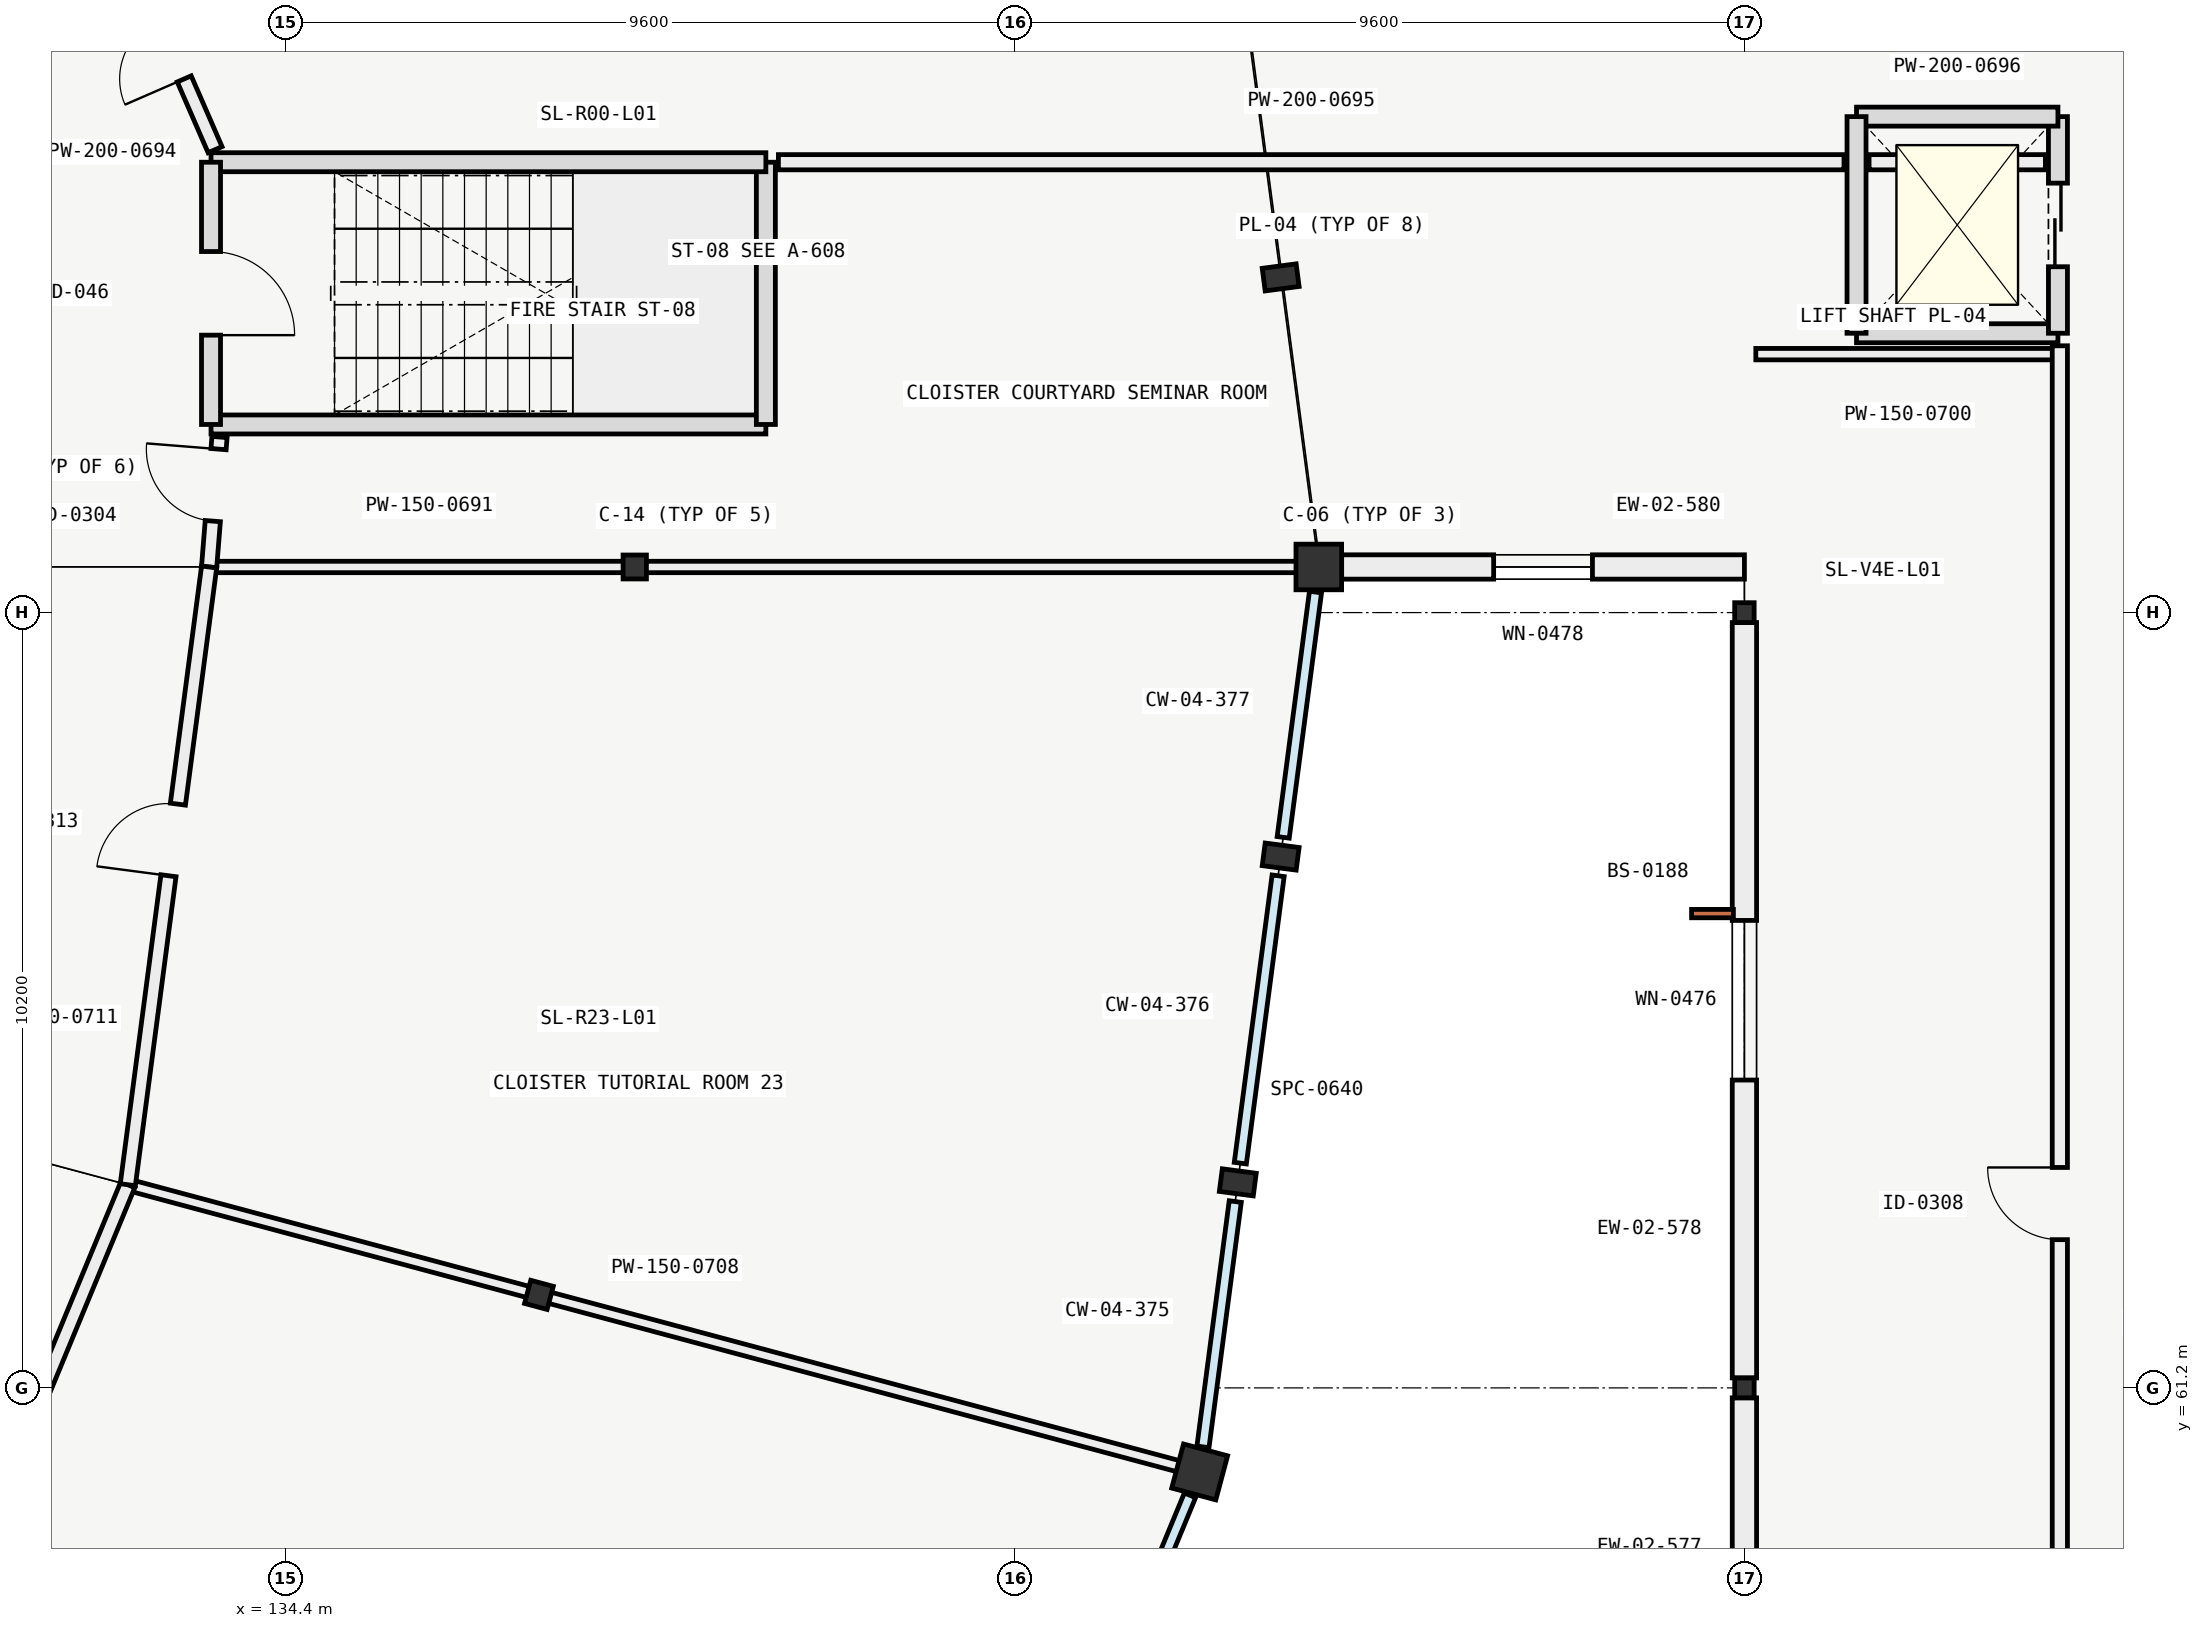
"""IFC4 building model, lengths in metres.
Left out: names, types, materials, properties, quantities, classifications, styles, units other than length and angle.
Written with IfcOpenShell. Run it as: python <this file> out.ifc"""

import sys

from ifc_helpers import new_model, si_unit, direction, frame, frame_2d, origin, origin_2d, place, context, subcontext, project, spatial, rectangle, i_section, extrude, element, fill, save


model = new_model("IFC4")
c1 = context("Model", 3, precision=1e-05, world=origin(), true_north=direction((0.0, 1.0)))
c2 = subcontext(c1, "Body", "Model", "MODEL_VIEW")
j1 = project(units=[si_unit("LENGTHUNIT", "METRE"), si_unit("PLANEANGLEUNIT", "RADIAN")], contexts=[c1])
p1 = place(None, origin())
s1 = spatial("IfcSite", under=j1, at=p1, CompositionType="ELEMENT")
p2 = place(p1, origin())
s2 = spatial("IfcBuilding", under=s1, at=p2, CompositionType="ELEMENT")
p3 = place(p2, frame((0.0, 0.0, 5.4)))
s3 = spatial("IfcBuildingStorey", under=s2, at=p3, CompositionType="ELEMENT", Elevation=5.4)
p4 = place(p3, frame((139.0, 72.0, 0.0), z_axis=(0.0, 0.0, 1.0), x_axis=(1.0, 0.0, 0.0)))
e1 = element("IfcColumn", 1, at=p4, inside=s3, PredefinedType="COLUMN", context=c2, shape_type="SweptSolid", body=[
    extrude(i_section(OverallWidth=0.307, OverallDepth=0.315, WebThickness=0.012, FlangeThickness=0.019, FilletRadius=0.017, at=origin_2d()), origin(), (0.0, 0.0, 1.0), 4.2),
])
p5 = place(p3, frame((148.0, 72.0, 0.0), z_axis=(0.0, 0.0, 1.0), x_axis=(1.0, 0.0, 0.0)))
e2 = element("IfcColumn", 2, at=p5, inside=s3, PredefinedType="COLUMN", context=c2, shape_type="SweptSolid", body=[
    extrude(rectangle(XDim=0.6, YDim=0.6, at=origin_2d()), origin(), (0.0, 0.0, 1.0), 4.2),
])
p6 = place(p3, frame((137.739, 62.424, 0.0), z_axis=(0.0, 0.0, 1.0), x_axis=(-0.965925826289, 0.258819045103, 0.0)))
e3 = element("IfcColumn", 3, at=p6, inside=s3, PredefinedType="COLUMN", context=c2, shape_type="SweptSolid", body=[
    extrude(i_section(OverallWidth=0.307, OverallDepth=0.315, WebThickness=0.012, FlangeThickness=0.019, FilletRadius=0.017, at=origin_2d()), origin(), (0.0, 0.0, 1.0), 4.2),
])
p7 = place(p3, frame((146.433, 60.094, 0.0), z_axis=(0.0, 0.0, 1.0), x_axis=(-0.965925826289, 0.258819045103, 0.0)))
e4 = element("IfcColumn", 4, at=p7, inside=s3, PredefinedType="COLUMN", context=c2, shape_type="SweptSolid", body=[
    extrude(rectangle(XDim=0.6, YDim=0.6, at=origin_2d()), origin(), (0.0, 0.0, 1.0), 4.2),
])
for number, where, z_axis, x_axis in (
    (5, (147.498, 75.81, 0.0), (0.0, 0.0, 1.0), (-0.131, 0.991, 0.0)),
    (6, (146.934, 63.904, 0.0), (0.0, 0.0, 1.0), (0.131, 0.991, 0.0)),
    (7, (147.498, 68.19, 0.0), (0.0, 0.0, 1.0), (0.131, 0.991, 0.0)),
):
    element("IfcColumn", number, at=place(p3, frame(where, z_axis=z_axis, x_axis=x_axis)), inside=s3, PredefinedType="PILASTER", context=c2, shape_type="SweptSolid", body=[
        extrude(rectangle(XDim=0.3, YDim=0.45, at=origin_2d()), origin(), (0.0, 0.0, 1.0), 4.2),
    ])
for number, where, z_axis, x_axis in (
    (8, (153.6, 61.2, 0.0), (0.0, 0.0, 1.0), (1.0, 0.0, 0.0)),
    (9, (153.6, 71.4, 0.0), (0.0, 0.0, 1.0), (1.0, 0.0, 0.0)),
):
    element("IfcColumn", number, at=place(p3, frame(where, z_axis=z_axis, x_axis=x_axis)), inside=s3, PredefinedType="COLUMN", context=c2, shape_type="SweptSolid", body=[
        extrude(i_section(OverallWidth=0.256, OverallDepth=0.26, WebThickness=0.01, FlangeThickness=0.017, FilletRadius=0.014, at=origin_2d()), origin(), (0.0, 0.0, 1.0), 4.2),
    ])
p8 = place(p3, frame((153.6, 51.131, 0.0), z_axis=(0.0, 0.0, 1.0), x_axis=(0.0, 1.0, 0.0)))
e10 = element("IfcWall", 10, at=p8, inside=s3, PredefinedType="SOLIDWALL", context=c2, shape_type="SweptSolid", body=[
    extrude(rectangle(XDim=9.938, YDim=0.32, at=frame_2d((4.969, 0.0))), origin(), (0.0, 0.0, 1.0), 3.514),
])
p9 = place(p8, frame((3.919, 0.0, 0.85)))
e11 = element("IfcOpeningElement", 11, at=p9, cuts=e10, PredefinedType="OPENING", context=c2, shape_type="SweptSolid", body=[
    extrude(rectangle(XDim=2.1, YDim=2.4, at=frame_2d((1.05, 1.2))), frame((0.0, 0.17, 0.0), z_axis=(0.0, -1.0, 0.0), x_axis=(1.0, 0.0, 0.0)), (0.0, 0.0, 1.0), 0.34),
])
p10 = place(p3, frame((153.6, 61.331, 0.0), z_axis=(0.0, 0.0, 1.0), x_axis=(0.0, 1.0, 0.0)))
e12 = element("IfcWall", 12, at=p10, inside=s3, PredefinedType="SOLIDWALL", context=c2, shape_type="SweptSolid", body=[
    extrude(rectangle(XDim=9.938, YDim=0.32, at=frame_2d((4.969, 0.0))), origin(), (0.0, 0.0, 1.0), 3.514),
])
p11 = place(p10, frame((3.919, 0.0, 0.85)))
e13 = element("IfcOpeningElement", 13, at=p11, cuts=e12, PredefinedType="OPENING", context=c2, shape_type="SweptSolid", body=[
    extrude(rectangle(XDim=2.1, YDim=2.4, at=frame_2d((1.05, 1.2))), frame((0.0, 0.17, 0.0), z_axis=(0.0, -1.0, 0.0), x_axis=(1.0, 0.0, 0.0)), (0.0, 0.0, 1.0), 0.34),
])
p12 = place(p3, frame((153.6, 72.0, 0.0), z_axis=(0.0, 0.0, 1.0), x_axis=(-1.0, 0.0, 0.0)))
e14 = element("IfcWall", 14, at=p12, inside=s3, PredefinedType="SOLIDWALL", context=c2, shape_type="SweptSolid", body=[
    extrude(rectangle(XDim=5.299, YDim=0.32, at=frame_2d((2.649, 0.0))), origin(), (0.0, 0.0, 1.0), 3.494),
])
p13 = place(p12, frame((2.0, 0.0, 0.9)))
e15 = element("IfcOpeningElement", 15, at=p13, cuts=e14, PredefinedType="OPENING", context=c2, shape_type="SweptSolid", body=[
    extrude(rectangle(XDim=1.3, YDim=1.75, at=frame_2d((0.65, 0.875))), frame((0.0, 0.17, 0.0), z_axis=(0.0, -1.0, 0.0), x_axis=(1.0, 0.0, 0.0)), (0.0, 0.0, 1.0), 0.34),
])
p14 = place(p3, frame((133.425, 73.875, 0.0), z_axis=(0.0, 0.0, 1.0), x_axis=(1.0, 0.0, 0.0)))
e16 = element("IfcWall", 16, at=p14, inside=s3, PredefinedType="SOLIDWALL", context=c2, shape_type="SweptSolid", body=[
    extrude(rectangle(XDim=7.3, YDim=0.25, at=frame_2d((3.65, 0.0))), origin(), (0.0, 0.0, 1.0), 3.92),
])
p15 = place(p3, frame((140.725, 73.875, 0.0), z_axis=(0.0, 0.0, 1.0), x_axis=(0.0, 1.0, 0.0)))
e17 = element("IfcWall", 17, at=p15, inside=s3, PredefinedType="SOLIDWALL", context=c2, shape_type="SweptSolid", body=[
    extrude(rectangle(XDim=3.45, YDim=0.25, at=frame_2d((1.725, 0.0))), origin(), (0.0, 0.0, 1.0), 3.92),
])
p16 = place(p3, frame((140.725, 77.325, 0.0), z_axis=(0.0, 0.0, 1.0), x_axis=(-1.0, 0.0, 0.0)))
e18 = element("IfcWall", 18, at=p16, inside=s3, PredefinedType="SOLIDWALL", context=c2, shape_type="SweptSolid", body=[
    extrude(rectangle(XDim=7.3, YDim=0.25, at=frame_2d((3.65, 0.0))), origin(), (0.0, 0.0, 1.0), 3.92),
])
p17 = place(p3, frame((133.425, 77.325, 0.0), z_axis=(0.0, 0.0, 1.0), x_axis=(0.0, -1.0, 0.0)))
e19 = element("IfcWall", 19, at=p17, inside=s3, PredefinedType="SOLIDWALL", context=c2, shape_type="SweptSolid", body=[
    extrude(rectangle(XDim=3.45, YDim=0.25, at=frame_2d((1.725, 0.0))), origin(), (0.0, 0.0, 1.0), 3.92),
])
p18 = place(p17, frame((1.175, 0.0, 0.0)))
e20 = element("IfcOpeningElement", 20, at=p18, cuts=e19, PredefinedType="OPENING", context=c2, shape_type="SweptSolid", body=[
    extrude(rectangle(XDim=1.1, YDim=2.2, at=frame_2d((0.55, 1.1))), frame((0.0, 0.135, 0.0), z_axis=(0.0, -1.0, 0.0), x_axis=(1.0, 0.0, 0.0)), (0.0, 0.0, 1.0), 0.27),
])
p19 = place(p3, frame((155.075, 75.075, 0.0), z_axis=(0.0, 0.0, 1.0), x_axis=(1.0, 0.0, 0.0)))
e21 = element("IfcWall", 21, at=p19, inside=s3, PredefinedType="SOLIDWALL", context=c2, shape_type="SweptSolid", body=[
    extrude(rectangle(XDim=2.65, YDim=0.25, at=frame_2d((1.325, 0.0))), origin(), (0.0, 0.0, 1.0), 3.92),
])
p20 = place(p3, frame((157.725, 75.075, 0.0), z_axis=(0.0, 0.0, 1.0), x_axis=(0.0, 1.0, 0.0)))
e22 = element("IfcWall", 22, at=p20, inside=s3, PredefinedType="SOLIDWALL", context=c2, shape_type="SweptSolid", body=[
    extrude(rectangle(XDim=2.85, YDim=0.25, at=frame_2d((1.425, 0.0))), origin(), (0.0, 0.0, 1.0), 3.92),
])
p21 = place(p20, frame((0.875, 0.0, 0.0)))
e23 = element("IfcOpeningElement", 23, at=p21, cuts=e22, PredefinedType="OPENING", context=c2, shape_type="SweptSolid", body=[
    extrude(rectangle(XDim=1.1, YDim=2.1, at=frame_2d((0.55, 1.05))), frame((0.0, 0.135, 0.0), z_axis=(0.0, -1.0, 0.0), x_axis=(1.0, 0.0, 0.0)), (0.0, 0.0, 1.0), 0.27),
])
p22 = place(p3, frame((157.725, 77.925, 0.0), z_axis=(0.0, 0.0, 1.0), x_axis=(-1.0, 0.0, 0.0)))
e24 = element("IfcWall", 24, at=p22, inside=s3, PredefinedType="SOLIDWALL", context=c2, shape_type="SweptSolid", body=[
    extrude(rectangle(XDim=2.65, YDim=0.25, at=frame_2d((1.325, 0.0))), origin(), (0.0, 0.0, 1.0), 3.92),
])
p23 = place(p3, frame((155.075, 77.925, 0.0), z_axis=(0.0, 0.0, 1.0), x_axis=(0.0, -1.0, 0.0)))
e25 = element("IfcWall", 25, at=p23, inside=s3, PredefinedType="SOLIDWALL", context=c2, shape_type="SweptSolid", body=[
    extrude(rectangle(XDim=2.85, YDim=0.25, at=frame_2d((1.425, 0.0))), origin(), (0.0, 0.0, 1.0), 3.92),
])
p24 = place(p3, frame((133.4, 72.0, 0.0), z_axis=(0.0, 0.0, 1.0), x_axis=(1.0, 0.0, 0.0)))
e26 = element("IfcWall", 26, at=p24, inside=s3, PredefinedType="PARTITIONING", context=c2, shape_type="SweptSolid", body=[
    extrude(rectangle(XDim=14.48, YDim=0.15, at=frame_2d((7.24, 0.0))), origin(), (0.0, 0.0, 1.0), 3.367),
])
p25 = place(p3, frame((133.4, 72.0, 0.0), z_axis=(0.0, 0.0, 1.0), x_axis=(0.07984138391, 0.996807580938, 0.0)))
e27 = element("IfcWall", 27, at=p25, inside=s3, PredefinedType="PARTITIONING", context=c2, shape_type="SweptSolid", body=[
    extrude(rectangle(XDim=1.715, YDim=0.2, at=frame_2d((0.858, 0.0))), origin(), (0.0, 0.0, 1.0), 3.372),
])
p26 = place(p25, frame((0.605, 0.0, 0.0)))
e28 = element("IfcOpeningElement", 28, at=p26, cuts=e27, PredefinedType="OPENING", context=c2, shape_type="SweptSolid", body=[
    extrude(rectangle(XDim=0.95, YDim=2.1, at=frame_2d((0.475, 1.05))), frame((0.0, 0.11, 0.0), z_axis=(0.0, -1.0, 0.0), x_axis=(1.0, 0.0, 0.0)), (0.0, 0.0, 1.0), 0.22),
])
p27 = place(p3, frame((133.478, 77.49, 0.0), z_axis=(0.0, 0.0, 1.0), x_axis=(-0.399219580964, 0.916855346374, 0.0)))
e29 = element("IfcWall", 29, at=p27, inside=s3, PredefinedType="PARTITIONING", context=c2, shape_type="SweptSolid", body=[
    extrude(rectangle(XDim=2.876, YDim=0.2, at=frame_2d((1.438, 0.0))), origin(), (0.0, 0.0, 1.0), 3.372),
])
p28 = place(p27, frame((1.016, 0.0, 0.0)))
e30 = element("IfcOpeningElement", 30, at=p28, cuts=e29, PredefinedType="OPENING", context=c2, shape_type="SweptSolid", body=[
    extrude(rectangle(XDim=1.7, YDim=2.2, at=frame_2d((0.85, 1.1))), frame((0.0, 0.11, 0.0), z_axis=(0.0, -1.0, 0.0), x_axis=(1.0, 0.0, 0.0)), (0.0, 0.0, 1.0), 0.22),
])
p29 = place(p3, frame((140.89, 77.325, 0.0), z_axis=(0.0, 0.0, 1.0), x_axis=(1.0, 0.0, 0.0)))
e31 = element("IfcWall", 31, at=p29, inside=s3, PredefinedType="PARTITIONING", context=c2, shape_type="SweptSolid", body=[
    extrude(rectangle(XDim=14.02, YDim=0.2, at=frame_2d((7.01, 0.0))), origin(), (0.0, 0.0, 1.0), 3.443),
])
p30 = place(p3, frame((155.24, 77.325, 0.0), z_axis=(0.0, 0.0, 1.0), x_axis=(1.0, 0.0, 0.0)))
e32 = element("IfcWall", 32, at=p30, inside=s3, PredefinedType="PARTITIONING", context=c2, shape_type="SweptSolid", body=[
    extrude(rectangle(XDim=2.32, YDim=0.2, at=frame_2d((1.16, 0.0))), origin(), (0.0, 0.0, 1.0), 3.85),
])
p31 = place(p3, frame((153.75, 74.8, 0.0), z_axis=(0.0, 0.0, 1.0), x_axis=(1.0, 0.0, 0.0)))
e33 = element("IfcWall", 33, at=p31, inside=s3, PredefinedType="PARTITIONING", context=c2, shape_type="SweptSolid", body=[
    extrude(rectangle(XDim=4.0, YDim=0.15, at=frame_2d((2.0, 0.0))), origin(), (0.0, 0.0, 1.0), 3.85),
])
p32 = place(p3, frame((157.75, 51.15, 0.0), z_axis=(0.0, 0.0, 1.0), x_axis=(0.0, 1.0, 0.0)))
e34 = element("IfcWall", 34, at=p32, inside=s3, PredefinedType="PARTITIONING", context=c2, shape_type="SweptSolid", body=[
    extrude(rectangle(XDim=23.76, YDim=0.2, at=frame_2d((11.88, 0.0))), origin(), (0.0, 0.0, 1.0), 3.44),
])
p33 = place(p32, frame((12.0, 0.0, 0.0)))
e35 = element("IfcOpeningElement", 35, at=p33, cuts=e34, PredefinedType="OPENING", context=c2, shape_type="SweptSolid", body=[
    extrude(rectangle(XDim=0.95, YDim=2.1, at=frame_2d((0.475, 1.05))), frame((0.0, 0.11, 0.0), z_axis=(0.0, -1.0, 0.0), x_axis=(1.0, 0.0, 0.0)), (0.0, 0.0, 1.0), 0.22),
])
p34 = place(p3, frame((132.33, 63.873, 0.0), z_axis=(0.0, 0.0, 1.0), x_axis=(0.965928107853, -0.258810530041, 0.0)))
e36 = element("IfcWall", 36, at=p34, inside=s3, PredefinedType="PARTITIONING", context=c2, shape_type="SweptSolid", body=[
    extrude(rectangle(XDim=14.48, YDim=0.15, at=frame_2d((7.24, 0.0))), origin(), (0.0, 0.0, 1.0), 3.367),
])
p35 = place(p3, frame((129.193, 56.3, 0.0), z_axis=(0.0, 0.0, 1.0), x_axis=(0.382696385238, 0.923874167149, 0.0)))
e37 = element("IfcWall", 37, at=p35, inside=s3, PredefinedType="PARTITIONING", context=c2, shape_type="SweptSolid", body=[
    extrude(rectangle(XDim=8.197, YDim=0.2, at=frame_2d((4.099, 0.0))), origin(), (0.0, 0.0, 1.0), 3.372),
])
p36 = place(p3, frame((132.33, 63.873, 0.0), z_axis=(0.0, 0.0, 1.0), x_axis=(0.130513066404, 0.991446589332, 0.0)))
e38 = element("IfcWall", 38, at=p36, inside=s3, PredefinedType="PARTITIONING", context=c2, shape_type="SweptSolid", body=[
    extrude(rectangle(XDim=8.197, YDim=0.2, at=frame_2d((4.099, 0.0))), origin(), (0.0, 0.0, 1.0), 3.372),
])
p37 = place(p36, frame((4.1, 0.0, 0.0)))
e39 = element("IfcOpeningElement", 39, at=p37, cuts=e38, PredefinedType="OPENING", context=c2, shape_type="SweptSolid", body=[
    extrude(rectangle(XDim=0.95, YDim=2.1, at=frame_2d((0.475, 1.05))), frame((0.0, 0.11, 0.0), z_axis=(0.0, -1.0, 0.0), x_axis=(1.0, 0.0, 0.0)), (0.0, 0.0, 1.0), 0.22),
])
p38 = place(p11, origin())
e40 = element("IfcWindow", 40, at=p38, inside=s3, PartitioningType="SINGLE_PANEL", PredefinedType="WINDOW", context=c2, shape_type="SweptSolid", body=[
    extrude(rectangle(XDim=2.1, YDim=2.4, at=frame_2d((1.05, 1.2))), frame((0.0, 0.03, 0.0), z_axis=(0.0, -1.0, 0.0), x_axis=(1.0, 0.0, 0.0)), (0.0, 0.0, 1.0), 0.06),
])
fill(e13, e40)
p39 = place(p13, origin())
e41 = element("IfcWindow", 41, at=p39, inside=s3, PartitioningType="SINGLE_PANEL", PredefinedType="WINDOW", context=c2, shape_type="SweptSolid", body=[
    extrude(rectangle(XDim=1.3, YDim=1.75, at=frame_2d((0.65, 0.875))), frame((0.0, 0.03, 0.0), z_axis=(0.0, -1.0, 0.0), x_axis=(1.0, 0.0, 0.0)), (0.0, 0.0, 1.0), 0.06),
])
fill(e15, e41)
p40 = place(p18, origin())
e42 = element("IfcDoor", 42, at=p40, inside=s3, OperationType="SINGLE_SWING_RIGHT", PredefinedType="DOOR", context=c2, shape_type="SweptSolid", body=[
    extrude(rectangle(XDim=1.1, YDim=2.2, at=frame_2d((0.55, 1.1))), frame((0.0, 0.025, 0.0), z_axis=(0.0, -1.0, 0.0), x_axis=(1.0, 0.0, 0.0)), (0.0, 0.0, 1.0), 0.05),
])
fill(e20, e42)
p41 = place(p21, origin())
e43 = element("IfcDoor", 43, at=p41, inside=s3, OperationType="SLIDING_TO_LEFT", PredefinedType="DOOR", context=c2, shape_type="SweptSolid", body=[
    extrude(rectangle(XDim=1.1, YDim=2.1, at=frame_2d((0.55, 1.05))), frame((0.0, 0.025, 0.0), z_axis=(0.0, -1.0, 0.0), x_axis=(1.0, 0.0, 0.0)), (0.0, 0.0, 1.0), 0.05),
])
fill(e23, e43)
p42 = place(p26, origin())
e44 = element("IfcDoor", 44, at=p42, inside=s3, OperationType="SINGLE_SWING_RIGHT", PredefinedType="DOOR", context=c2, shape_type="SweptSolid", body=[
    extrude(rectangle(XDim=0.95, YDim=2.1, at=frame_2d((0.475, 1.05))), frame((0.0, 0.025, 0.0), z_axis=(0.0, -1.0, 0.0), x_axis=(1.0, 0.0, 0.0)), (0.0, 0.0, 1.0), 0.05),
])
fill(e28, e44)
p43 = place(p28, origin())
e45 = element("IfcDoor", 45, at=p43, inside=s3, OperationType="DOUBLE_DOOR_SINGLE_SWING", PredefinedType="DOOR", context=c2, shape_type="SweptSolid", body=[
    extrude(rectangle(XDim=1.7, YDim=2.2, at=frame_2d((0.85, 1.1))), frame((0.0, 0.025, 0.0), z_axis=(0.0, -1.0, 0.0), x_axis=(1.0, 0.0, 0.0)), (0.0, 0.0, 1.0), 0.05),
])
fill(e30, e45)
p44 = place(p33, origin())
e46 = element("IfcDoor", 46, at=p44, inside=s3, OperationType="SINGLE_SWING_RIGHT", PredefinedType="DOOR", context=c2, shape_type="SweptSolid", body=[
    extrude(rectangle(XDim=0.95, YDim=2.1, at=frame_2d((0.475, 1.05))), frame((0.0, 0.025, 0.0), z_axis=(0.0, -1.0, 0.0), x_axis=(1.0, 0.0, 0.0)), (0.0, 0.0, 1.0), 0.05),
])
fill(e35, e46)
p45 = place(p37, origin())
e47 = element("IfcDoor", 47, at=p45, inside=s3, OperationType="SINGLE_SWING_LEFT", PredefinedType="DOOR", context=c2, shape_type="SweptSolid", body=[
    extrude(rectangle(XDim=0.95, YDim=2.1, at=frame_2d((0.475, 1.05))), frame((0.0, 0.025, 0.0), z_axis=(0.0, -1.0, 0.0), x_axis=(1.0, 0.0, 0.0)), (0.0, 0.0, 1.0), 0.05),
])
fill(e39, e47)
save(model, sys.argv[1])
